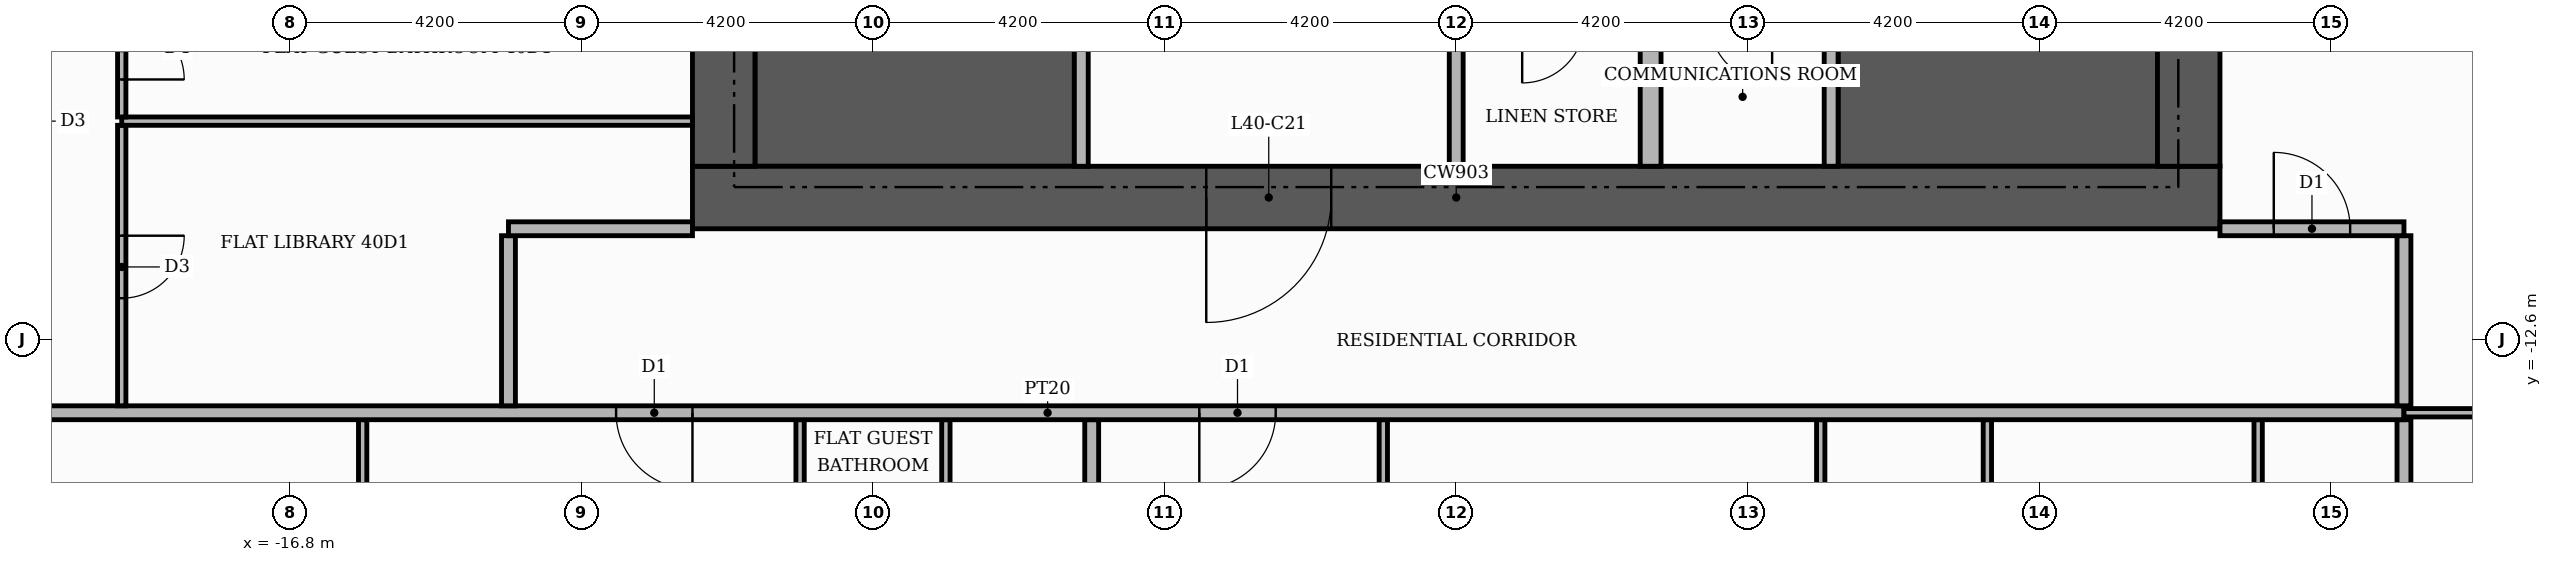
"""IFC4 building model, lengths in metres.
Left out: names, types, materials, properties, quantities, classifications, styles, units other than length and angle.
Written with IfcOpenShell. Run it as: python <this file> out.ifc"""

import sys

from ifc_helpers import new_model, si_unit, direction, frame, frame_2d, origin, place, context, subcontext, project, spatial, rectangle, extrude, element, fill, save


model = new_model("IFC4")
c1 = context("Model", 3, precision=1e-05, world=origin(), true_north=direction((0.0, 1.0)))
c2 = subcontext(c1, "Body", "Model", "MODEL_VIEW")
j1 = project(units=[si_unit("LENGTHUNIT", "METRE"), si_unit("PLANEANGLEUNIT", "RADIAN")], contexts=[c1])
p1 = place(None, origin())
s1 = spatial("IfcSite", under=j1, at=p1, CompositionType="ELEMENT")
p2 = place(p1, origin())
s2 = spatial("IfcBuilding", under=s1, at=p2, CompositionType="ELEMENT")
p3 = place(p2, frame((0.0, 0.0, 168.9)))
s3 = spatial("IfcBuildingStorey", under=s2, at=p3, CompositionType="ELEMENT", Elevation=168.9)
for number, where, z_axis, x_axis in (
    (1, (-10.1, -9.15, 0.0), (0.0, 0.0, 1.0), (1.0, 0.0, 0.0)),
    (2, (5.5, -9.15, 0.0), (0.0, 0.0, 1.0), (1.0, 0.0, 0.0)),
):
    element("IfcWall", number, at=place(p3, frame(where, z_axis=z_axis, x_axis=x_axis)), inside=s3, PredefinedType="SHEAR", context=c2, shape_type="SweptSolid", body=[
        extrude(rectangle(XDim=4.6, YDim=1.9, at=frame_2d((2.3, 0.0))), origin(), (0.0, 0.0, 1.0), 3.48),
    ])
p4 = place(p3, frame((-11.0, -10.55, 0.0), z_axis=(0.0, 0.0, 1.0), x_axis=(1.0, 0.0, 0.0)))
e3 = element("IfcWall", 3, at=p4, inside=s3, PredefinedType="SHEAR", context=c2, shape_type="SweptSolid", body=[
    extrude(rectangle(XDim=22.0, YDim=0.9, at=frame_2d((11.0, 0.0))), origin(), (0.0, 0.0, 1.0), 3.48),
])
p5 = place(p4, frame((7.4, 0.0, 0.0)))
e4 = element("IfcOpeningElement", 4, at=p5, cuts=e3, PredefinedType="OPENING", context=c2, shape_type="SweptSolid", body=[
    extrude(rectangle(XDim=1.8, YDim=2.2, at=frame_2d((0.9, 1.1))), frame((0.0, 0.46, 0.0), z_axis=(0.0, -1.0, 0.0), x_axis=(1.0, 0.0, 0.0)), (0.0, 0.0, 1.0), 0.92),
])
for number, where, z_axis, x_axis in (
    (5, (-10.55, -10.1, 0.0), (0.0, 0.0, 1.0), (0.0, 1.0, 0.0)),
    (6, (10.55, -10.1, 0.0), (0.0, 0.0, 1.0), (0.0, 1.0, 0.0)),
):
    element("IfcWall", number, at=place(p3, frame(where, z_axis=z_axis, x_axis=x_axis)), inside=s3, PredefinedType="SHEAR", context=c2, shape_type="SweptSolid", body=[
        extrude(rectangle(XDim=20.2, YDim=0.9, at=frame_2d((10.1, 0.0))), origin(), (0.0, 0.0, 1.0), 3.48),
    ])
p6 = place(p3, frame((-5.4, -10.1, 0.0), z_axis=(0.0, 0.0, 1.0), x_axis=(0.0, 1.0, 0.0)))
e7 = element("IfcWall", 7, at=p6, inside=s3, PredefinedType="PARTITIONING", context=c2, shape_type="SweptSolid", body=[
    extrude(rectangle(XDim=4.6, YDim=0.2, at=frame_2d((2.3, 0.0))), origin(), (0.0, 0.0, 1.0), 3.48),
])
p7 = place(p6, frame((2.9, 0.0, 0.0)))
e8 = element("IfcOpeningElement", 8, at=p7, cuts=e7, PredefinedType="OPENING", context=c2, shape_type="SweptSolid", body=[
    extrude(rectangle(XDim=1.0, YDim=2.1, at=frame_2d((0.5, 1.05))), frame((0.0, 0.11, 0.0), z_axis=(0.0, -1.0, 0.0), x_axis=(1.0, 0.0, 0.0)), (0.0, 0.0, 1.0), 0.22),
])
p8 = place(p3, frame((0.0, -10.1, 0.0), z_axis=(0.0, 0.0, 1.0), x_axis=(0.0, 1.0, 0.0)))
e9 = element("IfcWall", 9, at=p8, inside=s3, PredefinedType="PARTITIONING", context=c2, shape_type="SweptSolid", body=[
    extrude(rectangle(XDim=2.2, YDim=0.2, at=frame_2d((1.1, 0.0))), origin(), (0.0, 0.0, 1.0), 3.48),
])
p9 = place(p3, frame((2.8, -10.1, 0.0), z_axis=(0.0, 0.0, 1.0), x_axis=(0.0, 1.0, 0.0)))
e10 = element("IfcWall", 10, at=p9, inside=s3, PredefinedType="PARTITIONING", context=c2, shape_type="SweptSolid", body=[
    extrude(rectangle(XDim=2.2, YDim=0.3, at=frame_2d((1.1, 0.0))), origin(), (0.0, 0.0, 1.0), 3.48),
])
p10 = place(p3, frame((5.4, -10.1, 0.0), z_axis=(0.0, 0.0, 1.0), x_axis=(0.0, 1.0, 0.0)))
e11 = element("IfcWall", 11, at=p10, inside=s3, PredefinedType="PARTITIONING", context=c2, shape_type="SweptSolid", body=[
    extrude(rectangle(XDim=4.6, YDim=0.2, at=frame_2d((2.3, 0.0))), origin(), (0.0, 0.0, 1.0), 3.48),
])
p11 = place(p10, frame((2.9, 0.0, 0.0)))
e12 = element("IfcOpeningElement", 12, at=p11, cuts=e11, PredefinedType="OPENING", context=c2, shape_type="SweptSolid", body=[
    extrude(rectangle(XDim=1.0, YDim=2.1, at=frame_2d((0.5, 1.05))), frame((0.0, 0.11, 0.0), z_axis=(0.0, -1.0, 0.0), x_axis=(1.0, 0.0, 0.0)), (0.0, 0.0, 1.0), 0.22),
])
for number, where, z_axis, x_axis in (
    (13, (-5.25, -25.42, 0.0), (0.0, 0.0, 1.0), (0.0, 1.0, 0.0)),
    (14, (13.65, -25.42, 0.0), (0.0, 0.0, 1.0), (0.0, 1.0, 0.0)),
):
    element("IfcWall", number, at=place(p3, frame(where, z_axis=z_axis, x_axis=x_axis)), inside=s3, PredefinedType="PARTITIONING", context=c2, shape_type="SweptSolid", body=[
        extrude(rectangle(XDim=11.67, YDim=0.2, at=frame_2d((5.835, 0.0))), origin(), (0.0, 0.0, 1.0), 3.48),
    ])
p12 = place(p3, frame((-15.75, -20.06, 0.0), z_axis=(0.0, 0.0, 1.0), x_axis=(0.0, 1.0, 0.0)))
e15 = element("IfcWall", 15, at=p12, inside=s3, PredefinedType="PARTITIONING", context=c2, shape_type="SweptSolid", body=[
    extrude(rectangle(XDim=6.31, YDim=0.12, at=frame_2d((3.155, 0.0))), origin(), (0.0, 0.0, 1.0), 3.48),
])
p13 = place(p12, frame((2.675, 0.0, 0.0)))
e16 = element("IfcOpeningElement", 16, at=p13, cuts=e15, PredefinedType="OPENING", context=c2, shape_type="SweptSolid", body=[
    extrude(rectangle(XDim=1.0, YDim=2.1, at=frame_2d((0.5, 1.05))), frame((0.0, 0.07, 0.0), z_axis=(0.0, -1.0, 0.0), x_axis=(1.0, 0.0, 0.0)), (0.0, 0.0, 1.0), 0.14),
])
for number, where, z_axis, x_axis in (
    (17, (-1.05, -18.86, 0.0), (0.0, 0.0, 1.0), (0.0, 1.0, 0.0)),
    (18, (5.25, -18.86, 0.0), (0.0, 0.0, 1.0), (0.0, 1.0, 0.0)),
    (19, (7.65, -18.86, 0.0), (0.0, 0.0, 1.0), (0.0, 1.0, 0.0)),
    (20, (11.55, -18.86, 0.0), (0.0, 0.0, 1.0), (0.0, 1.0, 0.0)),
):
    element("IfcWall", number, at=place(p3, frame(where, z_axis=z_axis, x_axis=x_axis)), inside=s3, PredefinedType="PARTITIONING", context=c2, shape_type="SweptSolid", body=[
        extrude(rectangle(XDim=5.11, YDim=0.12, at=frame_2d((2.555, 0.0))), origin(), (0.0, 0.0, 1.0), 3.48),
    ])
p14 = place(p3, frame((-9.45, -18.56, 0.0), z_axis=(0.0, 0.0, 1.0), x_axis=(0.0, 1.0, 0.0)))
e21 = element("IfcWall", 21, at=p14, inside=s3, PredefinedType="PARTITIONING", context=c2, shape_type="SweptSolid", body=[
    extrude(rectangle(XDim=4.81, YDim=0.12, at=frame_2d((2.405, 0.0))), origin(), (0.0, 0.0, 1.0), 3.48),
])
p15 = place(p14, frame((1.975, 0.0, 0.0)))
e22 = element("IfcOpeningElement", 22, at=p15, cuts=e21, PredefinedType="OPENING", context=c2, shape_type="SweptSolid", body=[
    extrude(rectangle(XDim=0.9, YDim=2.1, at=frame_2d((0.45, 1.05))), frame((0.0, 0.07, 0.0), z_axis=(0.0, -1.0, 0.0), x_axis=(1.0, 0.0, 0.0)), (0.0, 0.0, 1.0), 0.14),
])
p16 = place(p3, frame((-7.35, -18.56, 0.0), z_axis=(0.0, 0.0, 1.0), x_axis=(0.0, 1.0, 0.0)))
e23 = element("IfcWall", 23, at=p16, inside=s3, PredefinedType="PARTITIONING", context=c2, shape_type="SweptSolid", body=[
    extrude(rectangle(XDim=4.81, YDim=0.12, at=frame_2d((2.405, 0.0))), origin(), (0.0, 0.0, 1.0), 3.48),
])
p17 = place(p3, frame((-25.42, -13.65, 0.0), z_axis=(0.0, 0.0, 1.0), x_axis=(1.0, 0.0, 0.0)))
e24 = element("IfcWall", 24, at=p17, inside=s3, PredefinedType="PARTITIONING", context=c2, shape_type="SweptSolid", body=[
    extrude(rectangle(XDim=39.07, YDim=0.2, at=frame_2d((19.535, 0.0))), origin(), (0.0, 0.0, 1.0), 3.48),
])
p18 = place(p17, frame((13.32, 0.0, 0.0)))
e25 = element("IfcOpeningElement", 25, at=p18, cuts=e24, PredefinedType="OPENING", context=c2, shape_type="SweptSolid", body=[
    extrude(rectangle(XDim=1.1, YDim=2.4, at=frame_2d((0.55, 1.2))), frame((0.0, 0.11, 0.0), z_axis=(0.0, -1.0, 0.0), x_axis=(1.0, 0.0, 0.0)), (0.0, 0.0, 1.0), 0.22),
])
p19 = place(p17, frame((21.72, 0.0, 0.0)))
e26 = element("IfcOpeningElement", 26, at=p19, cuts=e24, PredefinedType="OPENING", context=c2, shape_type="SweptSolid", body=[
    extrude(rectangle(XDim=1.1, YDim=2.4, at=frame_2d((0.55, 1.2))), frame((0.0, 0.11, 0.0), z_axis=(0.0, -1.0, 0.0), x_axis=(1.0, 0.0, 0.0)), (0.0, 0.0, 1.0), 0.22),
])
p20 = place(p3, frame((13.65, -13.65, 0.0), z_axis=(0.0, 0.0, 1.0), x_axis=(1.0, 0.0, 0.0)))
e27 = element("IfcWall", 27, at=p20, inside=s3, PredefinedType="PARTITIONING", context=c2, shape_type="SweptSolid", body=[
    extrude(rectangle(XDim=6.17, YDim=0.12, at=frame_2d((3.085, 0.0))), origin(), (0.0, 0.0, 1.0), 3.48),
])
p21 = place(p20, frame((2.635, 0.0, 0.0)))
e28 = element("IfcOpeningElement", 28, at=p21, cuts=e27, PredefinedType="OPENING", context=c2, shape_type="SweptSolid", body=[
    extrude(rectangle(XDim=0.9, YDim=2.1, at=frame_2d((0.45, 1.05))), frame((0.0, 0.07, 0.0), z_axis=(0.0, -1.0, 0.0), x_axis=(1.0, 0.0, 0.0)), (0.0, 0.0, 1.0), 0.14),
])
p22 = place(p3, frame((-19.22, -13.55, 0.0), z_axis=(0.0, 0.0, 1.0), x_axis=(0.0, 1.0, 0.0)))
e29 = element("IfcWall", 29, at=p22, inside=s3, PredefinedType="PARTITIONING", context=c2, shape_type="SweptSolid", body=[
    extrude(rectangle(XDim=4.04, YDim=0.12, at=frame_2d((2.02, 0.0))), origin(), (0.0, 0.0, 1.0), 3.48),
])
p23 = place(p22, frame((1.55, 0.0, 0.0)))
e30 = element("IfcOpeningElement", 30, at=p23, cuts=e29, PredefinedType="OPENING", context=c2, shape_type="SweptSolid", body=[
    extrude(rectangle(XDim=0.9, YDim=2.1, at=frame_2d((0.45, 1.05))), frame((0.0, 0.07, 0.0), z_axis=(0.0, -1.0, 0.0), x_axis=(1.0, 0.0, 0.0)), (0.0, 0.0, 1.0), 0.14),
])
for number, where, z_axis, x_axis in (
    (31, (-13.65, -13.55, 0.0), (0.0, 0.0, 1.0), (0.0, 1.0, 0.0)),
    (32, (13.65, -13.55, 0.0), (0.0, 0.0, 1.0), (0.0, 1.0, 0.0)),
):
    element("IfcWall", number, at=place(p3, frame(where, z_axis=z_axis, x_axis=x_axis)), inside=s3, PredefinedType="PARTITIONING", context=c2, shape_type="SweptSolid", body=[
        extrude(rectangle(XDim=2.45, YDim=0.2, at=frame_2d((1.225, 0.0))), origin(), (0.0, 0.0, 1.0), 3.48),
    ])
p24 = place(p3, frame((-13.65, -11.0, 0.0), z_axis=(0.0, 0.0, 1.0), x_axis=(1.0, 0.0, 0.0)))
e33 = element("IfcWall", 33, at=p24, inside=s3, PredefinedType="PARTITIONING", context=c2, shape_type="SweptSolid", body=[
    extrude(rectangle(XDim=2.65, YDim=0.2, at=frame_2d((1.325, 0.0))), origin(), (0.0, 0.0, 1.0), 3.48),
])
p25 = place(p3, frame((11.0, -11.0, 0.0), z_axis=(0.0, 0.0, 1.0), x_axis=(1.0, 0.0, 0.0)))
e34 = element("IfcWall", 34, at=p25, inside=s3, PredefinedType="PARTITIONING", context=c2, shape_type="SweptSolid", body=[
    extrude(rectangle(XDim=2.65, YDim=0.2, at=frame_2d((1.325, 0.0))), origin(), (0.0, 0.0, 1.0), 3.48),
])
p26 = place(p25, frame((0.775, 0.0, 0.0)))
e35 = element("IfcOpeningElement", 35, at=p26, cuts=e34, PredefinedType="OPENING", context=c2, shape_type="SweptSolid", body=[
    extrude(rectangle(XDim=1.1, YDim=2.4, at=frame_2d((0.55, 1.2))), frame((0.0, 0.11, 0.0), z_axis=(0.0, -1.0, 0.0), x_axis=(1.0, 0.0, 0.0)), (0.0, 0.0, 1.0), 0.22),
])
p27 = place(p3, frame((-19.22, -9.45, 0.0), z_axis=(0.0, 0.0, 1.0), x_axis=(1.0, 0.0, 0.0)))
e36 = element("IfcWall", 36, at=p27, inside=s3, PredefinedType="PARTITIONING", context=c2, shape_type="SweptSolid", body=[
    extrude(rectangle(XDim=8.22, YDim=0.12, at=frame_2d((4.11, 0.0))), origin(), (0.0, 0.0, 1.0), 3.48),
])
p28 = place(p3, frame((-19.22, -9.39, 0.0), z_axis=(0.0, 0.0, 1.0), x_axis=(0.0, 1.0, 0.0)))
e37 = element("IfcWall", 37, at=p28, inside=s3, PredefinedType="PARTITIONING", context=c2, shape_type="SweptSolid", body=[
    extrude(rectangle(XDim=1.98, YDim=0.12, at=frame_2d((0.99, 0.0))), origin(), (0.0, 0.0, 1.0), 3.48),
])
p29 = place(p28, frame((0.54, 0.0, 0.0)))
e38 = element("IfcOpeningElement", 38, at=p29, cuts=e37, PredefinedType="OPENING", context=c2, shape_type="SweptSolid", body=[
    extrude(rectangle(XDim=0.9, YDim=2.1, at=frame_2d((0.45, 1.05))), frame((0.0, 0.07, 0.0), z_axis=(0.0, -1.0, 0.0), x_axis=(1.0, 0.0, 0.0)), (0.0, 0.0, 1.0), 0.14),
])
p30 = place(p5, frame((1.8, 0.0, 0.0), z_axis=(0.0, 0.0, 1.0), x_axis=(-1.0, 0.0, 0.0)))
e39 = element("IfcDoor", 39, at=p30, inside=s3, OperationType="DOUBLE_DOOR_SINGLE_SWING", PredefinedType="DOOR", context=c2, shape_type="SweptSolid", body=[
    extrude(rectangle(XDim=1.8, YDim=2.2, at=frame_2d((0.9, 1.1))), frame((0.0, 0.025, 0.0), z_axis=(0.0, -1.0, 0.0), x_axis=(1.0, 0.0, 0.0)), (0.0, 0.0, 1.0), 0.05),
])
fill(e4, e39)
p31 = place(p18, frame((1.1, 0.0, 0.0), z_axis=(0.0, 0.0, 1.0), x_axis=(-1.0, 0.0, 0.0)))
e40 = element("IfcDoor", 40, at=p31, inside=s3, OperationType="SINGLE_SWING_RIGHT", PredefinedType="DOOR", context=c2, shape_type="SweptSolid", body=[
    extrude(rectangle(XDim=1.1, YDim=2.4, at=frame_2d((0.55, 1.2))), frame((0.0, 0.025, 0.0), z_axis=(0.0, -1.0, 0.0), x_axis=(1.0, 0.0, 0.0)), (0.0, 0.0, 1.0), 0.05),
])
fill(e25, e40)
p32 = place(p19, frame((1.1, 0.0, 0.0), z_axis=(0.0, 0.0, 1.0), x_axis=(-1.0, 0.0, 0.0)))
e41 = element("IfcDoor", 41, at=p32, inside=s3, OperationType="SINGLE_SWING_LEFT", PredefinedType="DOOR", context=c2, shape_type="SweptSolid", body=[
    extrude(rectangle(XDim=1.1, YDim=2.4, at=frame_2d((0.55, 1.2))), frame((0.0, 0.025, 0.0), z_axis=(0.0, -1.0, 0.0), x_axis=(1.0, 0.0, 0.0)), (0.0, 0.0, 1.0), 0.05),
])
fill(e26, e41)
p33 = place(p26, origin())
e42 = element("IfcDoor", 42, at=p33, inside=s3, OperationType="SINGLE_SWING_LEFT", PredefinedType="DOOR", context=c2, shape_type="SweptSolid", body=[
    extrude(rectangle(XDim=1.1, YDim=2.4, at=frame_2d((0.55, 1.2))), frame((0.0, 0.025, 0.0), z_axis=(0.0, -1.0, 0.0), x_axis=(1.0, 0.0, 0.0)), (0.0, 0.0, 1.0), 0.05),
])
fill(e35, e42)
p34 = place(p29, frame((0.9, 0.0, 0.0), z_axis=(0.0, 0.0, 1.0), x_axis=(-1.0, 0.0, 0.0)))
e43 = element("IfcDoor", 43, at=p34, inside=s3, OperationType="SINGLE_SWING_LEFT", PredefinedType="DOOR", context=c2, shape_type="SweptSolid", body=[
    extrude(rectangle(XDim=0.9, YDim=2.1, at=frame_2d((0.45, 1.05))), frame((0.0, 0.025, 0.0), z_axis=(0.0, -1.0, 0.0), x_axis=(1.0, 0.0, 0.0)), (0.0, 0.0, 1.0), 0.05),
])
fill(e38, e43)
p35 = place(p23, frame((0.9, 0.0, 0.0), z_axis=(0.0, 0.0, 1.0), x_axis=(-1.0, 0.0, 0.0)))
e44 = element("IfcDoor", 44, at=p35, inside=s3, OperationType="SINGLE_SWING_RIGHT", PredefinedType="DOOR", context=c2, shape_type="SweptSolid", body=[
    extrude(rectangle(XDim=0.9, YDim=2.1, at=frame_2d((0.45, 1.05))), frame((0.0, 0.025, 0.0), z_axis=(0.0, -1.0, 0.0), x_axis=(1.0, 0.0, 0.0)), (0.0, 0.0, 1.0), 0.05),
])
fill(e30, e44)
save(model, sys.argv[1])
